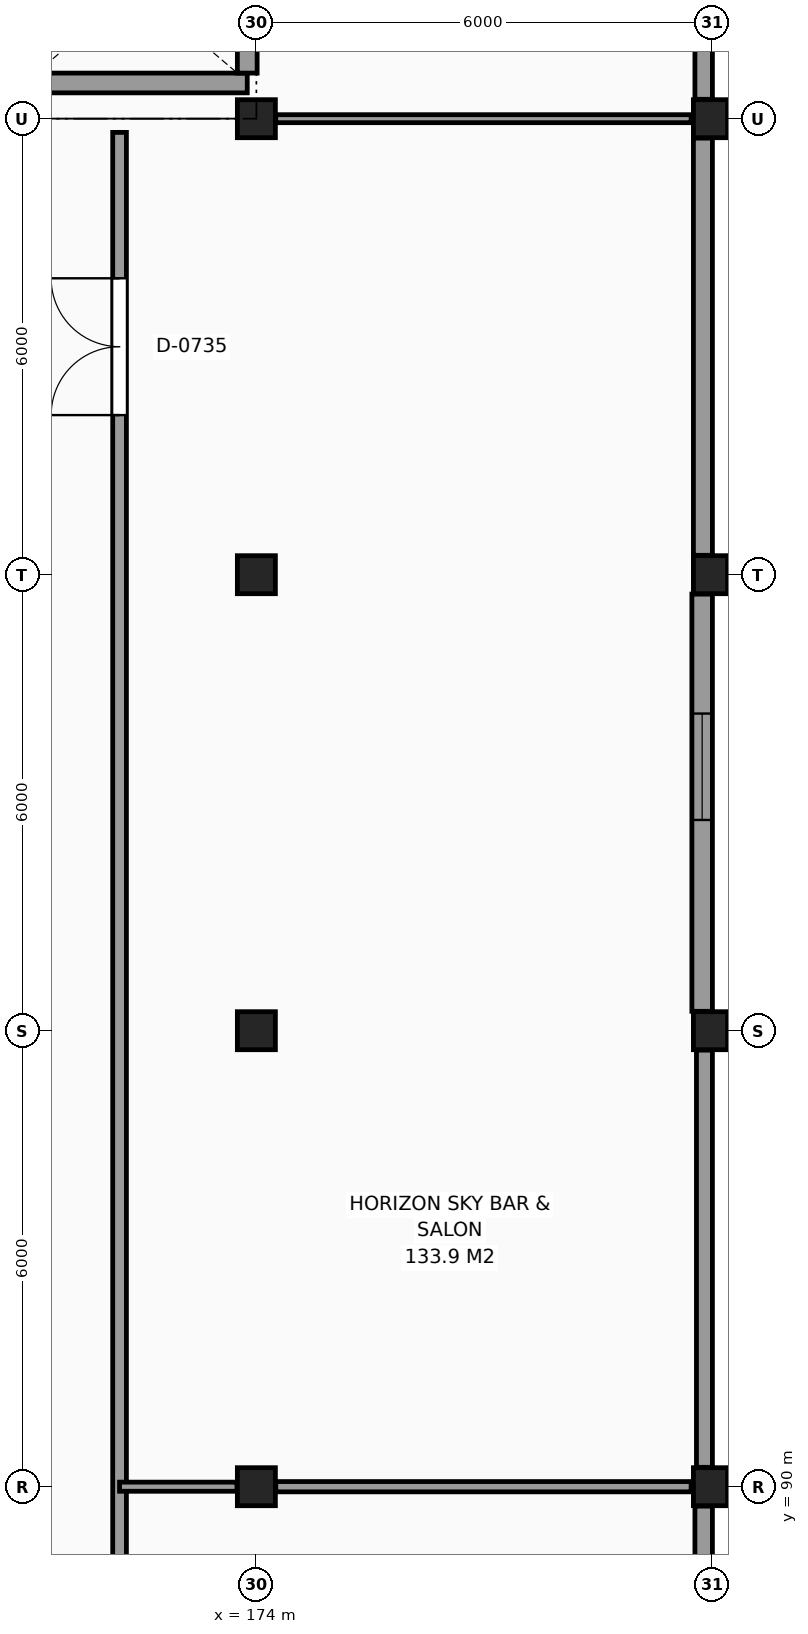
"""IFC4 building model, lengths in metres.
Left out: names, types, materials, properties, quantities, classifications, styles, units other than length and angle.
Written with IfcOpenShell. Run it as: python <this file> out.ifc"""

import sys

from ifc_helpers import new_model, si_unit, direction, frame, frame_2d, origin, origin_2d, place, context, subcontext, project, spatial, rectangle, extrude, element, fill, save


model = new_model("IFC4")
c1 = context("Model", 3, precision=1e-05, world=origin(), true_north=direction((0.0, 1.0)))
c2 = subcontext(c1, "Body", "Model", "MODEL_VIEW")
j1 = project(units=[si_unit("LENGTHUNIT", "METRE"), si_unit("PLANEANGLEUNIT", "RADIAN")], contexts=[c1])
p1 = place(None, origin())
s1 = spatial("IfcSite", under=j1, at=p1, CompositionType="ELEMENT")
p2 = place(p1, origin())
s2 = spatial("IfcBuilding", under=s1, at=p2, CompositionType="ELEMENT")
p3 = place(p2, frame((0.0, 0.0, 51.3)))
s3 = spatial("IfcBuildingStorey", under=s2, at=p3, CompositionType="ELEMENT", Elevation=51.3)
for number, where, z_axis, x_axis in (
    (1, (174.0, 90.0, 0.0), (0.0, 0.0, 1.0), (1.0, 0.0, 0.0)),
    (2, (174.0, 96.0, 0.0), (0.0, 0.0, 1.0), (1.0, 0.0, 0.0)),
    (3, (174.0, 102.0, 0.0), (0.0, 0.0, 1.0), (1.0, 0.0, 0.0)),
    (4, (174.0, 108.0, 0.0), (0.0, 0.0, 1.0), (1.0, 0.0, 0.0)),
    (5, (180.0, 90.0, 0.0), (0.0, 0.0, 1.0), (1.0, 0.0, 0.0)),
    (6, (180.0, 96.0, 0.0), (0.0, 0.0, 1.0), (1.0, 0.0, 0.0)),
    (7, (180.0, 102.0, 0.0), (0.0, 0.0, 1.0), (1.0, 0.0, 0.0)),
    (8, (180.0, 108.0, 0.0), (0.0, 0.0, 1.0), (1.0, 0.0, 0.0)),
):
    element("IfcColumn", number, at=place(p3, frame(where, z_axis=z_axis, x_axis=x_axis)), inside=s3, PredefinedType="COLUMN", context=c2, shape_type="SweptSolid", body=[
        extrude(rectangle(XDim=0.5, YDim=0.5, at=origin_2d()), origin(), (0.0, 0.0, 1.0), 3.3),
    ])
p4 = place(p3, frame((179.885, 84.255, 0.0), z_axis=(0.0, 0.0, 1.0), x_axis=(0.0, 1.0, 0.0)))
e9 = element("IfcWall", 9, at=p4, inside=s3, PredefinedType="SOLIDWALL", context=c2, shape_type="SweptSolid", body=[
    extrude(rectangle(XDim=5.49, YDim=0.23, at=frame_2d((2.745, 0.0))), origin(), (0.0, 0.0, 1.0), 2.46),
])
p5 = place(p3, frame((179.895, 90.255, 0.0), z_axis=(0.0, 0.0, 1.0), x_axis=(0.0, 1.0, 0.0)))
e10 = element("IfcWall", 10, at=p5, inside=s3, PredefinedType="SOLIDWALL", context=c2, shape_type="SweptSolid", body=[
    extrude(rectangle(XDim=5.49, YDim=0.21, at=frame_2d((2.745, 0.0))), origin(), (0.0, 0.0, 1.0), 2.61),
])
p6 = place(p3, frame((179.865, 96.255, 0.0), z_axis=(0.0, 0.0, 1.0), x_axis=(0.0, 1.0, 0.0)))
e11 = element("IfcWall", 11, at=p6, inside=s3, PredefinedType="SOLIDWALL", context=c2, shape_type="SweptSolid", body=[
    extrude(rectangle(XDim=5.49, YDim=0.27, at=frame_2d((2.745, 0.0))), origin(), (0.0, 0.0, 1.0), 2.46),
])
p7 = place(p6, frame((2.518, 0.0, 0.8)))
e12 = element("IfcOpeningElement", 12, at=p7, cuts=e11, PredefinedType="OPENING", context=c2, shape_type="SweptSolid", body=[
    extrude(rectangle(XDim=1.4, YDim=1.4, at=frame_2d((0.7, 0.7))), frame((0.0, 0.145, 0.0), z_axis=(0.0, -1.0, 0.0), x_axis=(1.0, 0.0, 0.0)), (0.0, 0.0, 1.0), 0.29),
])
p8 = place(p3, frame((179.875, 102.255, 0.0), z_axis=(0.0, 0.0, 1.0), x_axis=(0.0, 1.0, 0.0)))
e13 = element("IfcWall", 13, at=p8, inside=s3, PredefinedType="SOLIDWALL", context=c2, shape_type="SweptSolid", body=[
    extrude(rectangle(XDim=5.49, YDim=0.25, at=frame_2d((2.745, 0.0))), origin(), (0.0, 0.0, 1.0), 2.61),
])
p9 = place(p3, frame((179.885, 108.255, 0.0), z_axis=(0.0, 0.0, 1.0), x_axis=(0.0, 1.0, 0.0)))
e14 = element("IfcWall", 14, at=p9, inside=s3, PredefinedType="SOLIDWALL", context=c2, shape_type="SweptSolid", body=[
    extrude(rectangle(XDim=5.49, YDim=0.23, at=frame_2d((2.745, 0.0))), origin(), (0.0, 0.0, 1.0), 2.46),
])
p10 = place(p3, frame((170.97, 108.47, 0.0), z_axis=(0.0, 0.0, 1.0), x_axis=(1.0, 0.0, 0.0)))
e15 = element("IfcWall", 15, at=p10, inside=s3, PredefinedType="SHEAR", context=c2, shape_type="SweptSolid", body=[
    extrude(rectangle(XDim=2.91, YDim=0.26, at=frame_2d((1.455, 0.0))), origin(), (0.0, 0.0, 1.0), 3.3),
])
p11 = place(p3, frame((173.88, 108.6, 0.0), z_axis=(0.0, 0.0, 1.0), x_axis=(0.0, 1.0, 0.0)))
e16 = element("IfcWall", 16, at=p11, inside=s3, PredefinedType="SHEAR", context=c2, shape_type="SweptSolid", body=[
    extrude(rectangle(XDim=2.25, YDim=0.26, at=frame_2d((1.125, 0.0))), origin(), (0.0, 0.0, 1.0), 3.3),
])
p12 = place(p3, frame((172.2, 66.215, 0.0), z_axis=(0.0, 0.0, 1.0), x_axis=(0.0, 1.0, 0.0)))
e17 = element("IfcWall", 17, at=p12, inside=s3, PredefinedType="PARTITIONING", context=c2, shape_type="SweptSolid", body=[
    extrude(rectangle(XDim=41.605, YDim=0.18, at=frame_2d((20.802, 0.0))), origin(), (0.0, 0.0, 1.0), 3.06),
])
p13 = place(p12, frame((37.885, 0.0, 0.0)))
e18 = element("IfcOpeningElement", 18, at=p13, cuts=e17, PredefinedType="OPENING", context=c2, shape_type="SweptSolid", body=[
    extrude(rectangle(XDim=1.8, YDim=2.35, at=frame_2d((0.9, 1.175))), frame((0.0, 0.1, 0.0), z_axis=(0.0, -1.0, 0.0), x_axis=(1.0, 0.0, 0.0)), (0.0, 0.0, 1.0), 0.2),
])
p14 = place(p12, frame((14.235, 0.0, 0.0)))
e19 = element("IfcOpeningElement", 19, at=p14, cuts=e17, PredefinedType="OPENING", context=c2, shape_type="SweptSolid", body=[
    extrude(rectangle(XDim=1.1, YDim=2.15, at=frame_2d((0.55, 1.075))), frame((0.0, 0.1, 0.0), z_axis=(0.0, -1.0, 0.0), x_axis=(1.0, 0.0, 0.0)), (0.0, 0.0, 1.0), 0.2),
])
p15 = place(p3, frame((172.2, 90.0, 0.0), z_axis=(0.0, 0.0, 1.0), x_axis=(1.0, 0.0, 0.0)))
e20 = element("IfcWall", 20, at=p15, inside=s3, PredefinedType="PARTITIONING", context=c2, shape_type="SweptSolid", body=[
    extrude(rectangle(XDim=1.545, YDim=0.12, at=frame_2d((0.772, 0.0))), origin(), (0.0, 0.0, 1.0), 2.51),
])
p16 = place(p3, frame((174.255, 90.0, 0.0), z_axis=(0.0, 0.0, 1.0), x_axis=(1.0, 0.0, 0.0)))
e21 = element("IfcWall", 21, at=p16, inside=s3, PredefinedType="PARTITIONING", context=c2, shape_type="SweptSolid", body=[
    extrude(rectangle(XDim=5.465, YDim=0.135, at=frame_2d((2.732, 0.0))), origin(), (0.0, 0.0, 1.0), 2.62),
])
p17 = place(p3, frame((174.255, 108.0, 0.0), z_axis=(0.0, 0.0, 1.0), x_axis=(1.0, 0.0, 0.0)))
e22 = element("IfcWall", 22, at=p17, inside=s3, PredefinedType="PARTITIONING", context=c2, shape_type="SweptSolid", body=[
    extrude(rectangle(XDim=5.465, YDim=0.105, at=frame_2d((2.732, 0.0))), origin(), (0.0, 0.0, 1.0), 2.62),
])
p18 = place(p7, origin())
e23 = element("IfcWindow", 23, at=p18, inside=s3, PartitioningType="SINGLE_PANEL", PredefinedType="WINDOW", context=c2, shape_type="SweptSolid", body=[
    extrude(rectangle(XDim=1.4, YDim=1.4, at=frame_2d((0.7, 0.7))), frame((0.0, 0.03, 0.0), z_axis=(0.0, -1.0, 0.0), x_axis=(1.0, 0.0, 0.0)), (0.0, 0.0, 1.0), 0.06),
])
fill(e12, e23)
p19 = place(p13, origin())
e24 = element("IfcDoor", 24, at=p19, inside=s3, OperationType="DOUBLE_DOOR_SINGLE_SWING", PredefinedType="DOOR", context=c2, shape_type="SweptSolid", body=[
    extrude(rectangle(XDim=1.8, YDim=2.35, at=frame_2d((0.9, 1.175))), frame((0.0, 0.025, 0.0), z_axis=(0.0, -1.0, 0.0), x_axis=(1.0, 0.0, 0.0)), (0.0, 0.0, 1.0), 0.05),
])
fill(e18, e24)
save(model, sys.argv[1])
